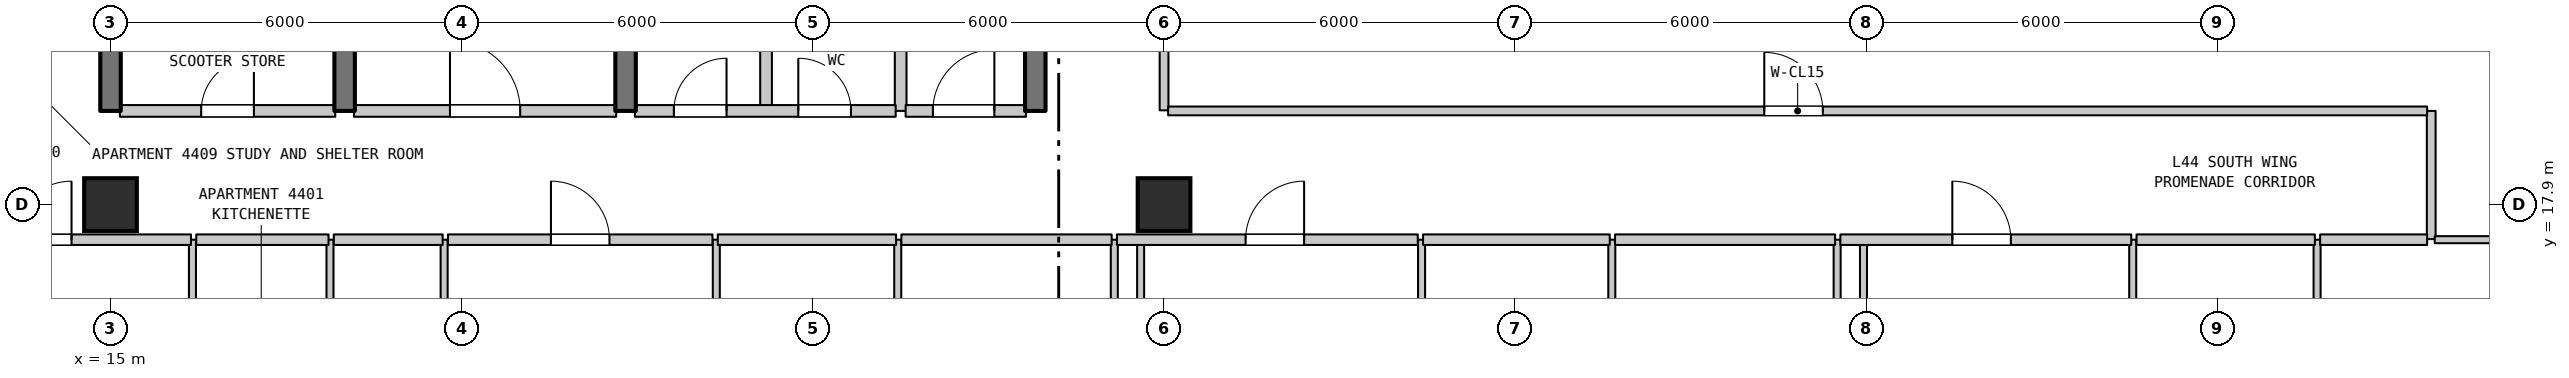
"""IFC4 building model, lengths in metres.
Left out: names, types, materials, properties, quantities, classifications, styles, units other than length and angle.
Written with IfcOpenShell. Run it as: python <this file> out.ifc"""

import sys

from ifc_helpers import new_model, si_unit, direction, frame, frame_2d, origin, origin_2d, place, context, subcontext, project, spatial, rectangle, extrude, element, fill, save


model = new_model("IFC4")
c1 = context("Model", 3, precision=1e-05, world=origin(), true_north=direction((0.0, 1.0)))
c2 = subcontext(c1, "Body", "Model", "MODEL_VIEW")
j1 = project(units=[si_unit("LENGTHUNIT", "METRE"), si_unit("PLANEANGLEUNIT", "RADIAN")], contexts=[c1])
p1 = place(None, origin())
s1 = spatial("IfcSite", under=j1, at=p1, CompositionType="ELEMENT")
p2 = place(p1, origin())
s2 = spatial("IfcBuilding", under=s1, at=p2, CompositionType="ELEMENT")
p3 = place(p2, frame((0.0, 0.0, 180.2)))
s3 = spatial("IfcBuildingStorey", under=s2, at=p3, CompositionType="ELEMENT", Elevation=180.2)
for number, where, z_axis, x_axis in (
    (1, (15.0, 17.9, 0.0), (0.0, 0.0, 1.0), (1.0, 0.0, 0.0)),
    (2, (33.0, 17.9, 0.0), (0.0, 0.0, 1.0), (1.0, 0.0, 0.0)),
):
    element("IfcColumn", number, at=place(p3, frame(where, z_axis=z_axis, x_axis=x_axis)), inside=s3, PredefinedType="COLUMN", context=c2, shape_type="SweptSolid", body=[
        extrude(rectangle(XDim=0.9, YDim=0.9, at=origin_2d()), origin(), (0.0, 0.0, 1.0), 3.7),
    ])
p4 = place(p3, frame((15.0, 19.5, 0.0), z_axis=(0.0, 0.0, 1.0), x_axis=(0.0, 1.0, 0.0)))
e3 = element("IfcWall", 3, at=p4, inside=s3, PredefinedType="SHEAR", context=c2, shape_type="SweptSolid", body=[
    extrude(rectangle(XDim=3.2, YDim=0.35, at=frame_2d((1.6, 0.0))), origin(), (0.0, 0.0, 1.0), 3.38),
])
p5 = place(p3, frame((16.4, 14.1, 0.0), z_axis=(0.0, 0.0, 1.0), x_axis=(0.0, 1.0, 0.0)))
e4 = element("IfcWall", 4, at=p5, inside=s3, PredefinedType="PARTITIONING", context=c2, shape_type="SweptSolid", body=[
    extrude(rectangle(XDim=3.2, YDim=0.12, at=frame_2d((1.6, 0.0))), origin(), (0.0, 0.0, 1.0), 3.38),
])
p6 = place(p5, frame((1.15, 0.0, 0.0)))
e5 = element("IfcOpeningElement", 5, at=p6, cuts=e4, PredefinedType="OPENING", context=c2, shape_type="SweptSolid", body=[
    extrude(rectangle(XDim=0.9, YDim=2.15, at=frame_2d((0.45, 1.075))), frame((0.0, 0.07, 0.0), z_axis=(0.0, -1.0, 0.0), x_axis=(1.0, 0.0, 0.0)), (0.0, 0.0, 1.0), 0.14),
])
p7 = place(p3, frame((18.75, 14.1, 0.0), z_axis=(0.0, 0.0, 1.0), x_axis=(0.0, 1.0, 0.0)))
e6 = element("IfcWall", 6, at=p7, inside=s3, PredefinedType="PARTITIONING", context=c2, shape_type="SweptSolid", body=[
    extrude(rectangle(XDim=3.2, YDim=0.12, at=frame_2d((1.6, 0.0))), origin(), (0.0, 0.0, 1.0), 3.38),
])
p8 = place(p3, frame((19.0, 19.5, 0.0), z_axis=(0.0, 0.0, 1.0), x_axis=(0.0, 1.0, 0.0)))
e7 = element("IfcWall", 7, at=p8, inside=s3, PredefinedType="SHEAR", context=c2, shape_type="SweptSolid", body=[
    extrude(rectangle(XDim=3.2, YDim=0.35, at=frame_2d((1.6, 0.0))), origin(), (0.0, 0.0, 1.0), 3.38),
])
p9 = place(p3, frame((20.7, 6.977, 0.0), z_axis=(0.0, 0.0, 1.0), x_axis=(0.0, 1.0, 0.0)))
e8 = element("IfcWall", 8, at=p9, inside=s3, PredefinedType="PARTITIONING", context=c2, shape_type="SweptSolid", body=[
    extrude(rectangle(XDim=10.323, YDim=0.12, at=frame_2d((5.162, 0.0))), origin(), (0.0, 0.0, 1.0), 3.38),
])
p10 = place(p3, frame((23.8, 19.5, 0.0), z_axis=(0.0, 0.0, 1.0), x_axis=(0.0, 1.0, 0.0)))
e9 = element("IfcWall", 9, at=p10, inside=s3, PredefinedType="SHEAR", context=c2, shape_type="SweptSolid", body=[
    extrude(rectangle(XDim=3.2, YDim=0.35, at=frame_2d((1.6, 0.0))), origin(), (0.0, 0.0, 1.0), 3.38),
])
p11 = place(p3, frame((25.35, 11.15, 0.0), z_axis=(0.0, 0.0, 1.0), x_axis=(0.0, 1.0, 0.0)))
e10 = element("IfcWall", 10, at=p11, inside=s3, PredefinedType="PARTITIONING", context=c2, shape_type="SweptSolid", body=[
    extrude(rectangle(XDim=6.15, YDim=0.12, at=frame_2d((3.075, 0.0))), origin(), (0.0, 0.0, 1.0), 3.38),
])
p12 = place(p3, frame((26.2, 19.5, 0.0), z_axis=(0.0, 0.0, 1.0), x_axis=(0.0, 1.0, 0.0)))
e11 = element("IfcWall", 11, at=p12, inside=s3, PredefinedType="STANDARD", context=c2, shape_type="SweptSolid", body=[
    extrude(rectangle(XDim=3.2, YDim=0.2, at=frame_2d((1.6, 0.0))), origin(), (0.0, 0.0, 1.0), 3.38),
])
p13 = place(p3, frame((28.45, 11.15, 0.0), z_axis=(0.0, 0.0, 1.0), x_axis=(0.0, 1.0, 0.0)))
e12 = element("IfcWall", 12, at=p13, inside=s3, PredefinedType="PARTITIONING", context=c2, shape_type="SweptSolid", body=[
    extrude(rectangle(XDim=6.15, YDim=0.12, at=frame_2d((3.075, 0.0))), origin(), (0.0, 0.0, 1.0), 3.38),
])
p14 = place(p3, frame((28.5, 19.5, 0.0), z_axis=(0.0, 0.0, 1.0), x_axis=(0.0, 1.0, 0.0)))
e13 = element("IfcWall", 13, at=p14, inside=s3, PredefinedType="STANDARD", context=c2, shape_type="SweptSolid", body=[
    extrude(rectangle(XDim=3.2, YDim=0.2, at=frame_2d((1.6, 0.0))), origin(), (0.0, 0.0, 1.0), 3.38),
])
p15 = place(p3, frame((30.8, 19.5, 0.0), z_axis=(0.0, 0.0, 1.0), x_axis=(0.0, 1.0, 0.0)))
e14 = element("IfcWall", 14, at=p15, inside=s3, PredefinedType="SHEAR", context=c2, shape_type="SweptSolid", body=[
    extrude(rectangle(XDim=3.2, YDim=0.35, at=frame_2d((1.6, 0.0))), origin(), (0.0, 0.0, 1.0), 3.38),
])
p16 = place(p3, frame((32.15, 11.15, 0.0), z_axis=(0.0, 0.0, 1.0), x_axis=(0.0, 1.0, 0.0)))
e15 = element("IfcWall", 15, at=p16, inside=s3, PredefinedType="PARTITIONING", context=c2, shape_type="SweptSolid", body=[
    extrude(rectangle(XDim=6.15, YDim=0.12, at=frame_2d((3.075, 0.0))), origin(), (0.0, 0.0, 1.0), 3.38),
])
p17 = place(p3, frame((32.6, 14.85, 0.0), z_axis=(0.0, 0.0, 1.0), x_axis=(0.0, 1.0, 0.0)))
e16 = element("IfcWall", 16, at=p17, inside=s3, PredefinedType="PARTITIONING", context=c2, shape_type="SweptSolid", body=[
    extrude(rectangle(XDim=2.45, YDim=0.12, at=frame_2d((1.225, 0.0))), origin(), (0.0, 0.0, 1.0), 3.38),
])
p18 = place(p3, frame((33.0, 19.51, 0.0), z_axis=(0.0, 0.0, 1.0), x_axis=(0.0, 1.0, 0.0)))
e17 = element("IfcWall", 17, at=p18, inside=s3, PredefinedType="STANDARD", context=c2, shape_type="SweptSolid", body=[
    extrude(rectangle(XDim=5.99, YDim=0.15, at=frame_2d((2.995, 0.0))), origin(), (0.0, 0.0, 1.0), 2.98),
])
p19 = place(p18, frame((1.513, 0.0, 0.0)))
e18 = element("IfcOpeningElement", 18, at=p19, cuts=e17, PredefinedType="OPENING", context=c2, shape_type="SweptSolid", body=[
    extrude(rectangle(XDim=1.0, YDim=2.15, at=frame_2d((0.5, 1.075))), frame((0.0, 0.085, 0.0), z_axis=(0.0, -1.0, 0.0), x_axis=(1.0, 0.0, 0.0)), (0.0, 0.0, 1.0), 0.17),
])
for number, where, z_axis, x_axis in (
    (19, (37.4, 11.15, 0.0), (0.0, 0.0, 1.0), (0.0, 1.0, 0.0)),
    (20, (40.65, 11.15, 0.0), (0.0, 0.0, 1.0), (0.0, 1.0, 0.0)),
    (21, (44.5, 11.15, 0.0), (0.0, 0.0, 1.0), (0.0, 1.0, 0.0)),
):
    element("IfcWall", number, at=place(p3, frame(where, z_axis=z_axis, x_axis=x_axis)), inside=s3, PredefinedType="PARTITIONING", context=c2, shape_type="SweptSolid", body=[
        extrude(rectangle(XDim=6.15, YDim=0.12, at=frame_2d((3.075, 0.0))), origin(), (0.0, 0.0, 1.0), 3.38),
    ])
p20 = place(p3, frame((44.95, 0.71, 0.0), z_axis=(0.0, 0.0, 1.0), x_axis=(0.0, 1.0, 0.0)))
e22 = element("IfcWall", 22, at=p20, inside=s3, PredefinedType="PARTITIONING", context=c2, shape_type="SweptSolid", body=[
    extrude(rectangle(XDim=16.59, YDim=0.12, at=frame_2d((8.295, 0.0))), origin(), (0.0, 0.0, 1.0), 3.38),
])
for number, where, z_axis, x_axis in (
    (23, (49.55, 11.15, 0.0), (0.0, 0.0, 1.0), (0.0, 1.0, 0.0)),
    (24, (52.7, 11.15, 0.0), (0.0, 0.0, 1.0), (0.0, 1.0, 0.0)),
):
    element("IfcWall", number, at=place(p3, frame(where, z_axis=z_axis, x_axis=x_axis)), inside=s3, PredefinedType="PARTITIONING", context=c2, shape_type="SweptSolid", body=[
        extrude(rectangle(XDim=6.15, YDim=0.12, at=frame_2d((3.075, 0.0))), origin(), (0.0, 0.0, 1.0), 3.38),
    ])
p21 = place(p3, frame((54.65, 17.31, 0.0), z_axis=(0.0, 0.0, 1.0), x_axis=(0.0, 1.0, 0.0)))
e25 = element("IfcWall", 25, at=p21, inside=s3, PredefinedType="STANDARD", context=c2, shape_type="SweptSolid", body=[
    extrude(rectangle(XDim=2.19, YDim=0.15, at=frame_2d((1.095, 0.0))), origin(), (0.0, 0.0, 1.0), 3.38),
])
p22 = place(p3, frame((12.875, 17.3, 0.0), z_axis=(0.0, 0.0, 1.0), x_axis=(1.0, 0.0, 0.0)))
e26 = element("IfcWall", 26, at=p22, inside=s3, PredefinedType="STANDARD", context=c2, shape_type="SweptSolid", body=[
    extrude(rectangle(XDim=3.5, YDim=0.18, at=frame_2d((1.75, 0.0))), origin(), (0.0, 0.0, 1.0), 3.38),
])
p23 = place(p22, frame((0.459, 0.0, 0.0)))
e27 = element("IfcOpeningElement", 27, at=p23, cuts=e26, PredefinedType="OPENING", context=c2, shape_type="SweptSolid", body=[
    extrude(rectangle(XDim=1.0, YDim=2.15, at=frame_2d((0.5, 1.075))), frame((0.0, 0.1, 0.0), z_axis=(0.0, -1.0, 0.0), x_axis=(1.0, 0.0, 0.0)), (0.0, 0.0, 1.0), 0.2),
])
p24 = place(p3, frame((16.465, 17.3, 0.0), z_axis=(0.0, 0.0, 1.0), x_axis=(1.0, 0.0, 0.0)))
e28 = element("IfcWall", 28, at=p24, inside=s3, PredefinedType="STANDARD", context=c2, shape_type="SweptSolid", body=[
    extrude(rectangle(XDim=2.26, YDim=0.18, at=frame_2d((1.13, 0.0))), origin(), (0.0, 0.0, 1.0), 3.38),
])
p25 = place(p3, frame((18.815, 17.3, 0.0), z_axis=(0.0, 0.0, 1.0), x_axis=(1.0, 0.0, 0.0)))
e29 = element("IfcWall", 29, at=p25, inside=s3, PredefinedType="STANDARD", context=c2, shape_type="SweptSolid", body=[
    extrude(rectangle(XDim=1.86, YDim=0.18, at=frame_2d((0.93, 0.0))), origin(), (0.0, 0.0, 1.0), 3.38),
])
p26 = place(p3, frame((20.765, 17.3, 0.0), z_axis=(0.0, 0.0, 1.0), x_axis=(1.0, 0.0, 0.0)))
e30 = element("IfcWall", 30, at=p26, inside=s3, PredefinedType="STANDARD", context=c2, shape_type="SweptSolid", body=[
    extrude(rectangle(XDim=4.52, YDim=0.18, at=frame_2d((2.26, 0.0))), origin(), (0.0, 0.0, 1.0), 3.38),
])
p27 = place(p26, frame((1.76, 0.0, 0.0)))
e31 = element("IfcOpeningElement", 31, at=p27, cuts=e30, PredefinedType="OPENING", context=c2, shape_type="SweptSolid", body=[
    extrude(rectangle(XDim=1.0, YDim=2.15, at=frame_2d((0.5, 1.075))), frame((0.0, 0.1, 0.0), z_axis=(0.0, -1.0, 0.0), x_axis=(1.0, 0.0, 0.0)), (0.0, 0.0, 1.0), 0.2),
])
p28 = place(p3, frame((25.375, 17.3, 0.0), z_axis=(0.0, 0.0, 1.0), x_axis=(1.0, 0.0, 0.0)))
e32 = element("IfcWall", 32, at=p28, inside=s3, PredefinedType="STANDARD", context=c2, shape_type="SweptSolid", body=[
    extrude(rectangle(XDim=3.047, YDim=0.18, at=frame_2d((1.523, 0.0))), origin(), (0.0, 0.0, 1.0), 3.38),
])
p29 = place(p3, frame((28.512, 17.3, 0.0), z_axis=(0.0, 0.0, 1.0), x_axis=(1.0, 0.0, 0.0)))
e33 = element("IfcWall", 33, at=p29, inside=s3, PredefinedType="STANDARD", context=c2, shape_type="SweptSolid", body=[
    extrude(rectangle(XDim=3.593, YDim=0.18, at=frame_2d((1.796, 0.0))), origin(), (0.0, 0.0, 1.0), 3.38),
])
p30 = place(p3, frame((32.195, 17.3, 0.0), z_axis=(0.0, 0.0, 1.0), x_axis=(1.0, 0.0, 0.0)))
e34 = element("IfcWall", 34, at=p30, inside=s3, PredefinedType="STANDARD", context=c2, shape_type="SweptSolid", body=[
    extrude(rectangle(XDim=5.14, YDim=0.18, at=frame_2d((2.57, 0.0))), origin(), (0.0, 0.0, 1.0), 3.38),
])
p31 = place(p30, frame((2.198, 0.0, 0.0)))
e35 = element("IfcOpeningElement", 35, at=p31, cuts=e34, PredefinedType="OPENING", context=c2, shape_type="SweptSolid", body=[
    extrude(rectangle(XDim=1.0, YDim=2.15, at=frame_2d((0.5, 1.075))), frame((0.0, 0.1, 0.0), z_axis=(0.0, -1.0, 0.0), x_axis=(1.0, 0.0, 0.0)), (0.0, 0.0, 1.0), 0.2),
])
p32 = place(p3, frame((37.425, 17.3, 0.0), z_axis=(0.0, 0.0, 1.0), x_axis=(1.0, 0.0, 0.0)))
e36 = element("IfcWall", 36, at=p32, inside=s3, PredefinedType="STANDARD", context=c2, shape_type="SweptSolid", body=[
    extrude(rectangle(XDim=3.19, YDim=0.18, at=frame_2d((1.595, 0.0))), origin(), (0.0, 0.0, 1.0), 3.38),
])
p33 = place(p3, frame((40.705, 17.3, 0.0), z_axis=(0.0, 0.0, 1.0), x_axis=(1.0, 0.0, 0.0)))
e37 = element("IfcWall", 37, at=p33, inside=s3, PredefinedType="STANDARD", context=c2, shape_type="SweptSolid", body=[
    extrude(rectangle(XDim=3.76, YDim=0.18, at=frame_2d((1.88, 0.0))), origin(), (0.0, 0.0, 1.0), 3.38),
])
p34 = place(p3, frame((44.555, 17.3, 0.0), z_axis=(0.0, 0.0, 1.0), x_axis=(1.0, 0.0, 0.0)))
e38 = element("IfcWall", 38, at=p34, inside=s3, PredefinedType="STANDARD", context=c2, shape_type="SweptSolid", body=[
    extrude(rectangle(XDim=4.97, YDim=0.18, at=frame_2d((2.485, 0.0))), origin(), (0.0, 0.0, 1.0), 3.38),
])
p35 = place(p34, frame((1.913, 0.0, 0.0)))
e39 = element("IfcOpeningElement", 39, at=p35, cuts=e38, PredefinedType="OPENING", context=c2, shape_type="SweptSolid", body=[
    extrude(rectangle(XDim=1.0, YDim=2.15, at=frame_2d((0.5, 1.075))), frame((0.0, 0.1, 0.0), z_axis=(0.0, -1.0, 0.0), x_axis=(1.0, 0.0, 0.0)), (0.0, 0.0, 1.0), 0.2),
])
p36 = place(p3, frame((49.615, 17.3, 0.0), z_axis=(0.0, 0.0, 1.0), x_axis=(1.0, 0.0, 0.0)))
e40 = element("IfcWall", 40, at=p36, inside=s3, PredefinedType="STANDARD", context=c2, shape_type="SweptSolid", body=[
    extrude(rectangle(XDim=3.047, YDim=0.18, at=frame_2d((1.523, 0.0))), origin(), (0.0, 0.0, 1.0), 3.38),
])
p37 = place(p3, frame((52.752, 17.3, 0.0), z_axis=(0.0, 0.0, 1.0), x_axis=(1.0, 0.0, 0.0)))
e41 = element("IfcWall", 41, at=p37, inside=s3, PredefinedType="STANDARD", context=c2, shape_type="SweptSolid", body=[
    extrude(rectangle(XDim=1.828, YDim=0.18, at=frame_2d((0.914, 0.0))), origin(), (0.0, 0.0, 1.0), 3.38),
])
p38 = place(p3, frame((54.71, 17.3, 0.0), z_axis=(0.0, 0.0, 1.0), x_axis=(1.0, 0.0, 0.0)))
e42 = element("IfcWall", 42, at=p38, inside=s3, PredefinedType="PARTITIONING", context=c2, shape_type="SweptSolid", body=[
    extrude(rectangle(XDim=1.635, YDim=0.12, at=frame_2d((0.817, 0.0))), origin(), (0.0, 0.0, 1.0), 3.38),
])
p39 = place(p3, frame((15.16, 19.5, 0.0), z_axis=(0.0, 0.0, 1.0), x_axis=(1.0, 0.0, 0.0)))
e43 = element("IfcWall", 43, at=p39, inside=s3, PredefinedType="STANDARD", context=c2, shape_type="SweptSolid", body=[
    extrude(rectangle(XDim=3.68, YDim=0.2, at=frame_2d((1.84, 0.0))), origin(), (0.0, 0.0, 1.0), 3.38),
])
p40 = place(p39, frame((1.39, 0.0, 0.0)))
e44 = element("IfcOpeningElement", 44, at=p40, cuts=e43, PredefinedType="OPENING", context=c2, shape_type="SweptSolid", body=[
    extrude(rectangle(XDim=0.9, YDim=2.15, at=frame_2d((0.45, 1.075))), frame((0.0, 0.11, 0.0), z_axis=(0.0, -1.0, 0.0), x_axis=(1.0, 0.0, 0.0)), (0.0, 0.0, 1.0), 0.22),
])
p41 = place(p3, frame((19.16, 19.5, 0.0), z_axis=(0.0, 0.0, 1.0), x_axis=(1.0, 0.0, 0.0)))
e45 = element("IfcWall", 45, at=p41, inside=s3, PredefinedType="STANDARD", context=c2, shape_type="SweptSolid", body=[
    extrude(rectangle(XDim=4.48, YDim=0.2, at=frame_2d((2.24, 0.0))), origin(), (0.0, 0.0, 1.0), 3.38),
])
p42 = place(p41, frame((1.64, 0.0, 0.0)))
e46 = element("IfcOpeningElement", 46, at=p42, cuts=e45, PredefinedType="OPENING", context=c2, shape_type="SweptSolid", body=[
    extrude(rectangle(XDim=1.2, YDim=2.2, at=frame_2d((0.6, 1.1))), frame((0.0, 0.11, 0.0), z_axis=(0.0, -1.0, 0.0), x_axis=(1.0, 0.0, 0.0)), (0.0, 0.0, 1.0), 0.22),
])
p43 = place(p3, frame((23.96, 19.5, 0.0), z_axis=(0.0, 0.0, 1.0), x_axis=(1.0, 0.0, 0.0)))
e47 = element("IfcWall", 47, at=p43, inside=s3, PredefinedType="STANDARD", context=c2, shape_type="SweptSolid", body=[
    extrude(rectangle(XDim=4.455, YDim=0.2, at=frame_2d((2.228, 0.0))), origin(), (0.0, 0.0, 1.0), 3.38),
])
p44 = place(p43, frame((0.665, 0.0, 0.0)))
e48 = element("IfcOpeningElement", 48, at=p44, cuts=e47, PredefinedType="OPENING", context=c2, shape_type="SweptSolid", body=[
    extrude(rectangle(XDim=0.9, YDim=2.15, at=frame_2d((0.45, 1.075))), frame((0.0, 0.11, 0.0), z_axis=(0.0, -1.0, 0.0), x_axis=(1.0, 0.0, 0.0)), (0.0, 0.0, 1.0), 0.22),
])
p45 = place(p43, frame((2.791, 0.0, 0.0)))
e49 = element("IfcOpeningElement", 49, at=p45, cuts=e47, PredefinedType="OPENING", context=c2, shape_type="SweptSolid", body=[
    extrude(rectangle(XDim=0.9, YDim=2.15, at=frame_2d((0.45, 1.075))), frame((0.0, 0.11, 0.0), z_axis=(0.0, -1.0, 0.0), x_axis=(1.0, 0.0, 0.0)), (0.0, 0.0, 1.0), 0.22),
])
p46 = place(p3, frame((28.585, 19.5, 0.0), z_axis=(0.0, 0.0, 1.0), x_axis=(1.0, 0.0, 0.0)))
e50 = element("IfcWall", 50, at=p46, inside=s3, PredefinedType="STANDARD", context=c2, shape_type="SweptSolid", body=[
    extrude(rectangle(XDim=2.055, YDim=0.2, at=frame_2d((1.027, 0.0))), origin(), (0.0, 0.0, 1.0), 3.38),
])
p47 = place(p46, frame((0.466, 0.0, 0.0)))
e51 = element("IfcOpeningElement", 51, at=p47, cuts=e50, PredefinedType="OPENING", context=c2, shape_type="SweptSolid", body=[
    extrude(rectangle(XDim=1.05, YDim=2.15, at=frame_2d((0.525, 1.075))), frame((0.0, 0.11, 0.0), z_axis=(0.0, -1.0, 0.0), x_axis=(1.0, 0.0, 0.0)), (0.0, 0.0, 1.0), 0.22),
])
p48 = place(p3, frame((33.07, 19.5, 0.0), z_axis=(0.0, 0.0, 1.0), x_axis=(1.0, 0.0, 0.0)))
e52 = element("IfcWall", 52, at=p48, inside=s3, PredefinedType="STANDARD", context=c2, shape_type="SweptSolid", body=[
    extrude(rectangle(XDim=21.51, YDim=0.15, at=frame_2d((10.755, 0.0))), origin(), (0.0, 0.0, 1.0), 3.38),
])
p49 = place(p48, frame((10.185, 0.0, 0.0)))
e53 = element("IfcOpeningElement", 53, at=p49, cuts=e52, PredefinedType="OPENING", context=c2, shape_type="SweptSolid", body=[
    extrude(rectangle(XDim=1.0, YDim=2.15, at=frame_2d((0.5, 1.075))), frame((0.0, 0.085, 0.0), z_axis=(0.0, -1.0, 0.0), x_axis=(1.0, 0.0, 0.0)), (0.0, 0.0, 1.0), 0.17),
])
p50 = place(p23, origin())
e54 = element("IfcDoor", 54, at=p50, inside=s3, OperationType="SINGLE_SWING_RIGHT", PredefinedType="DOOR", context=c2, shape_type="SweptSolid", body=[
    extrude(rectangle(XDim=1.0, YDim=2.15, at=frame_2d((0.5, 1.075))), frame((0.0, 0.025, 0.0), z_axis=(0.0, -1.0, 0.0), x_axis=(1.0, 0.0, 0.0)), (0.0, 0.0, 1.0), 0.05),
])
fill(e27, e54)
p51 = place(p27, origin())
e55 = element("IfcDoor", 55, at=p51, inside=s3, OperationType="SINGLE_SWING_LEFT", PredefinedType="DOOR", context=c2, shape_type="SweptSolid", body=[
    extrude(rectangle(XDim=1.0, YDim=2.15, at=frame_2d((0.5, 1.075))), frame((0.0, 0.025, 0.0), z_axis=(0.0, -1.0, 0.0), x_axis=(1.0, 0.0, 0.0)), (0.0, 0.0, 1.0), 0.05),
])
fill(e31, e55)
p52 = place(p31, origin())
e56 = element("IfcDoor", 56, at=p52, inside=s3, OperationType="SINGLE_SWING_RIGHT", PredefinedType="DOOR", context=c2, shape_type="SweptSolid", body=[
    extrude(rectangle(XDim=1.0, YDim=2.15, at=frame_2d((0.5, 1.075))), frame((0.0, 0.025, 0.0), z_axis=(0.0, -1.0, 0.0), x_axis=(1.0, 0.0, 0.0)), (0.0, 0.0, 1.0), 0.05),
])
fill(e35, e56)
p53 = place(p35, origin())
e57 = element("IfcDoor", 57, at=p53, inside=s3, OperationType="SINGLE_SWING_LEFT", PredefinedType="DOOR", context=c2, shape_type="SweptSolid", body=[
    extrude(rectangle(XDim=1.0, YDim=2.15, at=frame_2d((0.5, 1.075))), frame((0.0, 0.025, 0.0), z_axis=(0.0, -1.0, 0.0), x_axis=(1.0, 0.0, 0.0)), (0.0, 0.0, 1.0), 0.05),
])
fill(e39, e57)
p54 = place(p40, origin())
e58 = element("IfcDoor", 58, at=p54, inside=s3, OperationType="SINGLE_SWING_RIGHT", PredefinedType="DOOR", context=c2, shape_type="SweptSolid", body=[
    extrude(rectangle(XDim=0.9, YDim=2.15, at=frame_2d((0.45, 1.075))), frame((0.0, 0.025, 0.0), z_axis=(0.0, -1.0, 0.0), x_axis=(1.0, 0.0, 0.0)), (0.0, 0.0, 1.0), 0.05),
])
fill(e44, e58)
p55 = place(p42, origin())
e59 = element("IfcDoor", 59, at=p55, inside=s3, OperationType="SINGLE_SWING_LEFT", PredefinedType="DOOR", context=c2, shape_type="SweptSolid", body=[
    extrude(rectangle(XDim=1.2, YDim=2.2, at=frame_2d((0.6, 1.1))), frame((0.0, 0.025, 0.0), z_axis=(0.0, -1.0, 0.0), x_axis=(1.0, 0.0, 0.0)), (0.0, 0.0, 1.0), 0.05),
])
fill(e46, e59)
p56 = place(p44, origin())
e60 = element("IfcDoor", 60, at=p56, inside=s3, OperationType="SINGLE_SWING_RIGHT", PredefinedType="DOOR", context=c2, shape_type="SweptSolid", body=[
    extrude(rectangle(XDim=0.9, YDim=2.15, at=frame_2d((0.45, 1.075))), frame((0.0, 0.025, 0.0), z_axis=(0.0, -1.0, 0.0), x_axis=(1.0, 0.0, 0.0)), (0.0, 0.0, 1.0), 0.05),
])
fill(e48, e60)
p57 = place(p45, origin())
e61 = element("IfcDoor", 61, at=p57, inside=s3, OperationType="SINGLE_SWING_LEFT", PredefinedType="DOOR", context=c2, shape_type="SweptSolid", body=[
    extrude(rectangle(XDim=0.9, YDim=2.15, at=frame_2d((0.45, 1.075))), frame((0.0, 0.025, 0.0), z_axis=(0.0, -1.0, 0.0), x_axis=(1.0, 0.0, 0.0)), (0.0, 0.0, 1.0), 0.05),
])
fill(e49, e61)
p58 = place(p47, origin())
e62 = element("IfcDoor", 62, at=p58, inside=s3, OperationType="SINGLE_SWING_RIGHT", PredefinedType="DOOR", context=c2, shape_type="SweptSolid", body=[
    extrude(rectangle(XDim=1.05, YDim=2.15, at=frame_2d((0.525, 1.075))), frame((0.0, 0.025, 0.0), z_axis=(0.0, -1.0, 0.0), x_axis=(1.0, 0.0, 0.0)), (0.0, 0.0, 1.0), 0.05),
])
fill(e51, e62)
p59 = place(p49, origin())
e63 = element("IfcDoor", 63, at=p59, inside=s3, OperationType="SINGLE_SWING_LEFT", PredefinedType="DOOR", context=c2, shape_type="SweptSolid", body=[
    extrude(rectangle(XDim=1.0, YDim=2.15, at=frame_2d((0.5, 1.075))), frame((0.0, 0.025, 0.0), z_axis=(0.0, -1.0, 0.0), x_axis=(1.0, 0.0, 0.0)), (0.0, 0.0, 1.0), 0.05),
])
fill(e53, e63)
save(model, sys.argv[1])
